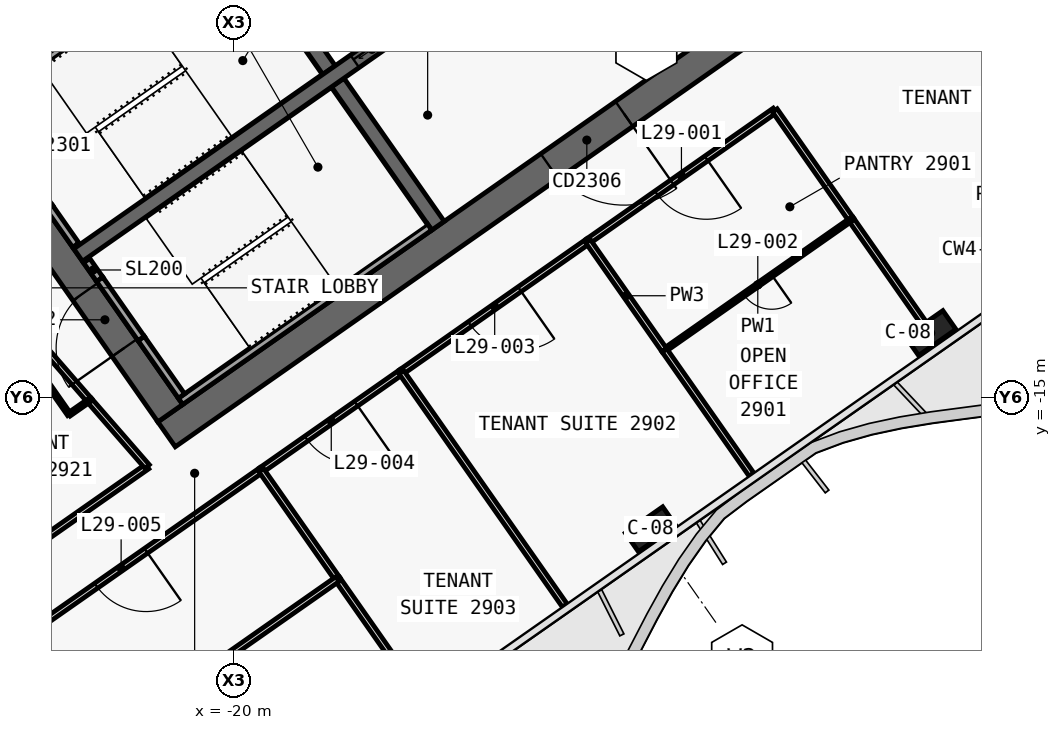
"""IFC4 building model, lengths in metres.
Left out: names, types, materials, properties, quantities, classifications, styles, units other than length and angle.
Written with IfcOpenShell. Run it as: python <this file> out.ifc"""

import sys

from ifc_helpers import new_model, si_unit, direction, frame, frame_2d, origin, origin_2d, place, context, subcontext, project, spatial, polyline, rectangle, outline, extrude, element, fill, save


model = new_model("IFC4")
c1 = context("Model", 3, precision=1e-05, world=origin(), true_north=direction((0.0, 1.0)))
c2 = subcontext(c1, "Body", "Model", "MODEL_VIEW")
j1 = project(units=[si_unit("LENGTHUNIT", "METRE"), si_unit("PLANEANGLEUNIT", "RADIAN")], contexts=[c1])
p1 = place(None, origin())
s1 = spatial("IfcSite", under=j1, at=p1, CompositionType="ELEMENT")
p2 = place(p1, origin())
s2 = spatial("IfcBuilding", under=s1, at=p2, CompositionType="ELEMENT")
p3 = place(p2, frame((0.0, 0.0, 132.0)))
s3 = spatial("IfcBuildingStorey", under=s2, at=p3, CompositionType="ELEMENT", Elevation=132.0)
p4 = place(p3, frame((0.029, 11.984, 0.0), z_axis=(0.0, 0.0, 1.0), x_axis=(-0.819151382952, -0.573577380837, 0.0)))
e1 = element("IfcWall", 1, at=p4, inside=s3, PredefinedType="SHEAR", context=c2, shape_type="SweptSolid", body=[
    extrude(outline(polyline([(33.898, 0.4), (0.56, 0.4), (-0.0, -0.4), (33.898, -0.4), (33.898, 0.4)])), origin(), (0.0, 0.0, 1.0), 3.9),
])
p5 = place(p3, frame((0.029, -0.712, 0.0), z_axis=(0.0, 0.0, 1.0), x_axis=(-0.819151758019, -0.573576845187, 0.0)))
e2 = element("IfcWall", 2, at=p5, inside=s3, PredefinedType="SHEAR", context=c2, shape_type="SweptSolid", body=[
    extrude(outline(polyline([(26.616, 0.4), (0.56, 0.4), (-0.0, -0.4), (26.616, -0.4), (26.616, 0.4)])), origin(), (0.0, 0.0, 1.0), 3.9),
])
p6 = place(p5, frame((2.966, 0.0, 0.0)))
e3 = element("IfcOpeningElement", 3, at=p6, cuts=e2, PredefinedType="OPENING", context=c2, shape_type="SweptSolid", body=[
    extrude(rectangle(XDim=2.4, YDim=2.1, at=frame_2d((1.2, 1.05))), frame((0.0, 0.41, 0.0), z_axis=(0.0, -1.0, 0.0), x_axis=(1.0, 0.0, 0.0)), (0.0, 0.0, 1.0), 0.82),
])
p7 = place(p5, frame((11.916, 0.0, 0.0)))
e4 = element("IfcOpeningElement", 4, at=p7, cuts=e2, PredefinedType="OPENING", context=c2, shape_type="SweptSolid", body=[
    extrude(rectangle(XDim=2.4, YDim=2.1, at=frame_2d((1.2, 1.05))), frame((0.0, 0.41, 0.0), z_axis=(0.0, -1.0, 0.0), x_axis=(1.0, 0.0, 0.0)), (0.0, 0.0, 1.0), 0.82),
])
p8 = place(p3, frame((-21.675, -15.421, 0.0), z_axis=(0.0, 0.0, 1.0), x_axis=(-0.573581815061, 0.819148278049, 0.0)))
e5 = element("IfcWall", 5, at=p8, inside=s3, PredefinedType="SHEAR", context=c2, shape_type="SweptSolid", body=[
    extrude(outline(polyline([(0.0, 0.4), (0.0, -0.4), (9.6, -0.4), (9.6, 0.4), (0.0, 0.4)])), origin(), (0.0, 0.0, 1.0), 3.9),
])
p9 = place(p8, frame((6.3, 0.0, 0.0)))
e6 = element("IfcOpeningElement", 6, at=p9, cuts=e5, PredefinedType="OPENING", context=c2, shape_type="SweptSolid", body=[
    extrude(rectangle(XDim=1.8, YDim=2.1, at=frame_2d((0.9, 1.05))), frame((0.0, 0.41, 0.0), z_axis=(0.0, -1.0, 0.0), x_axis=(1.0, 0.0, 0.0)), (0.0, 0.0, 1.0), 0.82),
])
p10 = place(p8, frame((2.1, 0.0, 0.0)))
e7 = element("IfcOpeningElement", 7, at=p10, cuts=e5, PredefinedType="OPENING", context=c2, shape_type="SweptSolid", body=[
    extrude(rectangle(XDim=1.8, YDim=2.1, at=frame_2d((0.9, 1.05))), frame((0.0, 0.41, 0.0), z_axis=(0.0, -1.0, 0.0), x_axis=(1.0, 0.0, 0.0)), (0.0, 0.0, 1.0), 0.82),
])
p11 = place(p3, frame((-14.63, -10.488, 0.0), z_axis=(0.0, 0.0, 1.0), x_axis=(-0.573611936273, 0.819127185829, 0.0)))
e8 = element("IfcWall", 8, at=p11, inside=s3, PredefinedType="SHEAR", context=c2, shape_type="SweptSolid", body=[
    extrude(outline(polyline([(4.6, 0.2), (0.0, 0.2), (0.0, -0.2), (4.6, -0.2), (4.6, 0.2)])), origin(), (0.0, 0.0, 1.0), 3.9),
])
p12 = place(p3, frame((-17.498, -6.392, 0.0), z_axis=(0.0, 0.0, 1.0), x_axis=(-0.573611936273, 0.819127185829, 0.0)))
e9 = element("IfcWall", 9, at=p12, inside=s3, PredefinedType="SHEAR", context=c2, shape_type="SweptSolid", body=[
    extrude(outline(polyline([(4.6, -0.2), (4.6, 0.2), (0.0, 0.2), (0.0, -0.2), (4.6, -0.2)])), origin(), (0.0, 0.0, 1.0), 3.9),
])
p13 = place(p3, frame((-2.638, 3.768, 0.0), z_axis=(0.0, 0.0, 1.0), x_axis=(-0.81915267502, -0.573575535572, 0.0)))
e10 = element("IfcWall", 10, at=p13, inside=s3, PredefinedType="SHEAR", context=c2, shape_type="SweptSolid", body=[
    extrude(outline(polyline([(26.2, 0.2), (0.0, 0.2), (0.0, -0.2), (26.2, -0.2), (26.2, 0.2)])), origin(), (0.0, 0.0, 1.0), 3.9),
])
p14 = place(p13, frame((1.169, 0.0, 0.0)))
e11 = element("IfcOpeningElement", 11, at=p14, cuts=e10, PredefinedType="OPENING", context=c2, shape_type="SweptSolid", body=[
    extrude(rectangle(XDim=1.1, YDim=2.1, at=frame_2d((0.55, 1.05))), frame((0.0, 0.21, 0.0), z_axis=(0.0, -1.0, 0.0), x_axis=(1.0, 0.0, 0.0)), (0.0, 0.0, 1.0), 0.42),
])
p15 = place(p13, frame((3.206, 0.0, 0.0)))
e12 = element("IfcOpeningElement", 12, at=p15, cuts=e10, PredefinedType="OPENING", context=c2, shape_type="SweptSolid", body=[
    extrude(rectangle(XDim=1.1, YDim=2.1, at=frame_2d((0.55, 1.05))), frame((0.0, 0.21, 0.0), z_axis=(0.0, -1.0, 0.0), x_axis=(1.0, 0.0, 0.0)), (0.0, 0.0, 1.0), 0.42),
])
p16 = place(p13, frame((5.244, 0.0, 0.0)))
e13 = element("IfcOpeningElement", 13, at=p16, cuts=e10, PredefinedType="OPENING", context=c2, shape_type="SweptSolid", body=[
    extrude(rectangle(XDim=1.1, YDim=2.1, at=frame_2d((0.55, 1.05))), frame((0.0, 0.21, 0.0), z_axis=(0.0, -1.0, 0.0), x_axis=(1.0, 0.0, 0.0)), (0.0, 0.0, 1.0), 0.42),
])
p17 = place(p13, frame((7.281, 0.0, 0.0)))
e14 = element("IfcOpeningElement", 14, at=p17, cuts=e10, PredefinedType="OPENING", context=c2, shape_type="SweptSolid", body=[
    extrude(rectangle(XDim=1.1, YDim=2.1, at=frame_2d((0.55, 1.05))), frame((0.0, 0.21, 0.0), z_axis=(0.0, -1.0, 0.0), x_axis=(1.0, 0.0, 0.0)), (0.0, 0.0, 1.0), 0.42),
])
p18 = place(p13, frame((9.688, 0.0, 0.0)))
e15 = element("IfcOpeningElement", 15, at=p18, cuts=e10, PredefinedType="OPENING", context=c2, shape_type="SweptSolid", body=[
    extrude(rectangle(XDim=1.1, YDim=2.1, at=frame_2d((0.55, 1.05))), frame((0.0, 0.21, 0.0), z_axis=(0.0, -1.0, 0.0), x_axis=(1.0, 0.0, 0.0)), (0.0, 0.0, 1.0), 0.42),
])
p19 = place(p13, frame((11.863, 0.0, 0.0)))
e16 = element("IfcOpeningElement", 16, at=p19, cuts=e10, PredefinedType="OPENING", context=c2, shape_type="SweptSolid", body=[
    extrude(rectangle(XDim=1.1, YDim=2.1, at=frame_2d((0.55, 1.05))), frame((0.0, 0.21, 0.0), z_axis=(0.0, -1.0, 0.0), x_axis=(1.0, 0.0, 0.0)), (0.0, 0.0, 1.0), 0.42),
])
p20 = place(p13, frame((14.038, 0.0, 0.0)))
e17 = element("IfcOpeningElement", 17, at=p20, cuts=e10, PredefinedType="OPENING", context=c2, shape_type="SweptSolid", body=[
    extrude(rectangle(XDim=1.1, YDim=2.1, at=frame_2d((0.55, 1.05))), frame((0.0, 0.21, 0.0), z_axis=(0.0, -1.0, 0.0), x_axis=(1.0, 0.0, 0.0)), (0.0, 0.0, 1.0), 0.42),
])
p21 = place(p13, frame((16.212, 0.0, 0.0)))
e18 = element("IfcOpeningElement", 18, at=p21, cuts=e10, PredefinedType="OPENING", context=c2, shape_type="SweptSolid", body=[
    extrude(rectangle(XDim=1.1, YDim=2.1, at=frame_2d((0.55, 1.05))), frame((0.0, 0.21, 0.0), z_axis=(0.0, -1.0, 0.0), x_axis=(1.0, 0.0, 0.0)), (0.0, 0.0, 1.0), 0.42),
])
for number, where, z_axis, x_axis in (
    (19, (-1.665, -13.313, 0.0), (0.0, 0.0, 1.0), (-0.819, -0.574, 0.0)),
    (20, (-9.038, -18.475, 0.0), (0.0, 0.0, 1.0), (-0.819, -0.574, 0.0)),
):
    element("IfcColumn", number, at=place(p3, frame(where, z_axis=z_axis, x_axis=x_axis)), inside=s3, PredefinedType="COLUMN", context=c2, shape_type="SweptSolid", body=[
        extrude(rectangle(XDim=1.2, YDim=0.6, at=origin_2d()), origin(), (0.0, 0.0, 1.0), 3.9),
    ])
p22 = place(p3, frame((-20.243, -2.821, 0.0), z_axis=(0.0, 0.0, 1.0), x_axis=(-0.819141584393, -0.57359137434, 0.0)))
e21 = element("IfcWall", 21, at=p22, inside=s3, PredefinedType="SOLIDWALL", context=c2, shape_type="SweptSolid", body=[
    extrude(rectangle(XDim=8.0, YDim=0.2, at=frame_2d((4.0, 0.0))), origin(), (0.0, 0.0, 1.0), 3.62),
])
p23 = place(p3, frame((-24.162, -10.998, 0.0), z_axis=(0.0, 0.0, 1.0), x_axis=(-0.573612502218, 0.819126789514, 0.0)))
e22 = element("IfcWall", 22, at=p23, inside=s3, PredefinedType="SOLIDWALL", context=c2, shape_type="SweptSolid", body=[
    extrude(rectangle(XDim=1.2, YDim=0.2, at=frame_2d((0.6, 0.0))), origin(), (0.0, 0.0, 1.0), 3.62),
])
p24 = place(p3, frame((-24.85, -10.014, 2.15), z_axis=(0.0, 0.0, 1.0), x_axis=(-0.573505465124, 0.819201734296, 0.0)))
e23 = element("IfcWall", 23, at=p24, inside=s3, PredefinedType="SOLIDWALL", context=c2, shape_type="SweptSolid", body=[
    extrude(rectangle(XDim=1.9, YDim=0.2, at=frame_2d((0.95, 0.0))), origin(), (0.0, 0.0, 1.0), 1.47),
])
p25 = place(p3, frame((-14.851, -10.521, 0.0), z_axis=(0.0, 0.0, 1.0), x_axis=(-0.819141584393, -0.57359137434, 0.0)))
e24 = element("IfcWall", 24, at=p25, inside=s3, PredefinedType="SOLIDWALL", context=c2, shape_type="SweptSolid", body=[
    extrude(rectangle(XDim=8.0, YDim=0.2, at=frame_2d((4.0, 0.0))), origin(), (0.0, 0.0, 1.0), 3.62),
])
p26 = place(p3, frame((-21.38, -14.97, 0.0), z_axis=(0.0, 0.0, 1.0), x_axis=(-0.573559770908, 0.819163713305, 0.0)))
e25 = element("IfcWall", 25, at=p26, inside=s3, PredefinedType="SOLIDWALL", context=c2, shape_type="SweptSolid", body=[
    extrude(rectangle(XDim=1.85, YDim=0.2, at=frame_2d((0.925, 0.0))), origin(), (0.0, 0.0, 1.0), 3.62),
])
p27 = place(p3, frame((-23.531, -11.898, 0.0), z_axis=(0.0, 0.0, 1.0), x_axis=(-0.573708088123, 0.819059844958, 0.0)))
e26 = element("IfcWall", 26, at=p27, inside=s3, PredefinedType="SOLIDWALL", context=c2, shape_type="SweptSolid", body=[
    extrude(rectangle(XDim=0.6, YDim=0.2, at=frame_2d((0.3, 0.0))), origin(), (0.0, 0.0, 1.0), 3.62),
])
p28 = place(p3, frame((-22.441, -13.455, 2.15), z_axis=(0.0, 0.0, 1.0), x_axis=(-0.573591692345, 0.819141361715, 0.0)))
e27 = element("IfcWall", 27, at=p28, inside=s3, PredefinedType="SOLIDWALL", context=c2, shape_type="SweptSolid", body=[
    extrude(rectangle(XDim=1.9, YDim=0.2, at=frame_2d((0.95, 0.0))), origin(), (0.0, 0.0, 1.0), 1.47),
])
p29 = place(p3, frame((-30.146, -22.33, 0.0), z_axis=(0.0, 0.0, 1.0), x_axis=(0.819150657747, 0.573578416533, 0.0)))
e28 = element("IfcWall", 28, at=p29, inside=s3, PredefinedType="PARTITIONING", context=c2, shape_type="SweptSolid", body=[
    extrude(rectangle(XDim=9.599, YDim=0.15, at=frame_2d((4.799, 0.0))), origin(), (0.0, 0.0, 1.0), 3.0),
])
p30 = place(p29, frame((4.0, 0.0, 0.0)))
e29 = element("IfcOpeningElement", 29, at=p30, cuts=e28, PredefinedType="OPENING", context=c2, shape_type="SweptSolid", body=[
    extrude(rectangle(XDim=1.6, YDim=2.1, at=frame_2d((0.8, 1.05))), frame((0.0, 0.085, 0.0), z_axis=(0.0, -1.0, 0.0), x_axis=(1.0, 0.0, 0.0)), (0.0, 0.0, 1.0), 0.17),
])
p31 = place(p3, frame((-5.766, -7.456, 0.0), z_axis=(0.0, 0.0, 1.0), x_axis=(-0.819147828287, -0.573582457378, 0.0)))
e30 = element("IfcWall", 30, at=p31, inside=s3, PredefinedType="PARTITIONING", context=c2, shape_type="SweptSolid", body=[
    extrude(rectangle(XDim=6.002, YDim=0.15, at=frame_2d((3.001, 0.0))), origin(), (0.0, 0.0, 1.0), 3.0),
])
p32 = place(p31, frame((2.201, 0.0, 0.0)))
e31 = element("IfcOpeningElement", 31, at=p32, cuts=e30, PredefinedType="OPENING", context=c2, shape_type="SweptSolid", body=[
    extrude(rectangle(XDim=1.6, YDim=2.1, at=frame_2d((0.8, 1.05))), frame((0.0, 0.085, 0.0), z_axis=(0.0, -1.0, 0.0), x_axis=(1.0, 0.0, 0.0)), (0.0, 0.0, 1.0), 0.17),
])
p33 = place(p3, frame((-10.68, -10.896, 0.0), z_axis=(0.0, 0.0, 1.0), x_axis=(-0.819145946981, -0.573585144111, 0.0)))
e32 = element("IfcWall", 32, at=p33, inside=s3, PredefinedType="PARTITIONING", context=c2, shape_type="SweptSolid", body=[
    extrude(rectangle(XDim=6.004, YDim=0.15, at=frame_2d((3.002, 0.0))), origin(), (0.0, 0.0, 1.0), 3.0),
])
p34 = place(p33, frame((2.202, 0.0, 0.0)))
e33 = element("IfcOpeningElement", 33, at=p34, cuts=e32, PredefinedType="OPENING", context=c2, shape_type="SweptSolid", body=[
    extrude(rectangle(XDim=1.6, YDim=2.1, at=frame_2d((0.8, 1.05))), frame((0.0, 0.085, 0.0), z_axis=(0.0, -1.0, 0.0), x_axis=(1.0, 0.0, 0.0)), (0.0, 0.0, 1.0), 0.17),
])
p35 = place(p3, frame((-15.594, -14.338, 0.0), z_axis=(0.0, 0.0, 1.0), x_axis=(-0.819165703328, -0.573556928727, 0.0)))
e34 = element("IfcWall", 34, at=p35, inside=s3, PredefinedType="PARTITIONING", context=c2, shape_type="SweptSolid", body=[
    extrude(rectangle(XDim=4.504, YDim=0.15, at=frame_2d((2.252, 0.0))), origin(), (0.0, 0.0, 1.0), 3.62),
])
p36 = place(p35, frame((1.452, 0.0, 0.0)))
e35 = element("IfcOpeningElement", 35, at=p36, cuts=e34, PredefinedType="OPENING", context=c2, shape_type="SweptSolid", body=[
    extrude(rectangle(XDim=1.6, YDim=2.1, at=frame_2d((0.8, 1.05))), frame((0.0, 0.085, 0.0), z_axis=(0.0, -1.0, 0.0), x_axis=(1.0, 0.0, 0.0)), (0.0, 0.0, 1.0), 0.17),
])
p37 = place(p3, frame((-19.281, -16.919, 0.0), z_axis=(0.0, 0.0, 1.0), x_axis=(-0.819151661297, -0.57357698332, 0.0)))
e36 = element("IfcWall", 36, at=p37, inside=s3, PredefinedType="PARTITIONING", context=c2, shape_type="SweptSolid", body=[
    extrude(rectangle(XDim=9.004, YDim=0.15, at=frame_2d((4.502, 0.0))), origin(), (0.0, 0.0, 1.0), 3.0),
])
p38 = place(p37, frame((3.702, 0.0, 0.0)))
e37 = element("IfcOpeningElement", 37, at=p38, cuts=e36, PredefinedType="OPENING", context=c2, shape_type="SweptSolid", body=[
    extrude(rectangle(XDim=1.6, YDim=2.1, at=frame_2d((0.8, 1.05))), frame((0.0, 0.085, 0.0), z_axis=(0.0, -1.0, 0.0), x_axis=(1.0, 0.0, 0.0)), (0.0, 0.0, 1.0), 0.17),
])
p39 = place(p3, frame((-1.849, -13.051, 0.0), z_axis=(0.0, 0.0, 1.0), x_axis=(-0.573600070244, 0.819135495151, 0.0)))
e38 = element("IfcWall", 38, at=p39, inside=s3, PredefinedType="PARTITIONING", context=c2, shape_type="SweptSolid", body=[
    extrude(rectangle(XDim=3.331, YDim=0.15, at=frame_2d((1.666, 0.0))), origin(), (0.0, 0.0, 1.0), 3.0),
])
p40 = place(p3, frame((-3.758, -10.324, 0.0), z_axis=(0.0, 0.0, 1.0), x_axis=(-0.573560539213, 0.819163175355, 0.0)))
e39 = element("IfcWall", 39, at=p40, inside=s3, PredefinedType="PARTITIONING", context=c2, shape_type="SweptSolid", body=[
    extrude(rectangle(XDim=3.504, YDim=0.15, at=frame_2d((1.752, 0.0))), origin(), (0.0, 0.0, 1.0), 3.0),
])
p41 = place(p3, frame((-23.802, -15.082, 0.0), z_axis=(0.0, 0.0, 1.0), x_axis=(-0.656784983898, 0.754077903751, 0.0)))
e40 = element("IfcWall", 40, at=p41, inside=s3, PredefinedType="PARTITIONING", context=c2, shape_type="SweptSolid", body=[
    extrude(rectangle(XDim=4.226, YDim=0.15, at=frame_2d((2.113, 0.0))), origin(), (0.0, 0.0, 1.0), 3.62),
])
p42 = place(p3, frame((-22.284, -16.826, 0.0), z_axis=(0.0, 0.0, 1.0), x_axis=(-0.656749820099, 0.754108529192, 0.0)))
e41 = element("IfcWall", 41, at=p42, inside=s3, PredefinedType="PARTITIONING", context=c2, shape_type="SweptSolid", body=[
    extrude(rectangle(XDim=2.317, YDim=0.15, at=frame_2d((1.159, 0.0))), origin(), (0.0, 0.0, 1.0), 3.0),
])
p43 = place(p3, frame((-24.337, -15.454, 0.0), z_axis=(0.0, 0.0, 1.0), x_axis=(0.819196675611, 0.573512690938, 0.0)))
e42 = element("IfcWall", 42, at=p43, inside=s3, PredefinedType="PARTITIONING", context=c2, shape_type="SweptSolid", body=[
    extrude(rectangle(XDim=0.651, YDim=0.1, at=frame_2d((0.325, 0.0))), origin(), (0.0, 0.0, 1.0), 3.62),
])
p44 = place(p3, frame((-25.026, -14.47, 0.0), z_axis=(0.0, 0.0, 1.0), x_axis=(0.57359875229, -0.819136418047, 0.0)))
e43 = element("IfcWall", 43, at=p44, inside=s3, PredefinedType="PARTITIONING", context=c2, shape_type="SweptSolid", body=[
    extrude(rectangle(XDim=1.201, YDim=0.1, at=frame_2d((0.601, 0.0))), origin(), (0.0, 0.0, 1.0), 3.62),
])
p45 = place(p3, frame((-3.758, -10.324, 0.0), z_axis=(0.0, 0.0, 1.0), x_axis=(-0.819149710902, -0.573579768758, 0.0)))
e44 = element("IfcWall", 44, at=p45, inside=s3, PredefinedType="PARTITIONING", context=c2, shape_type="SweptSolid", body=[
    extrude(rectangle(XDim=6.0, YDim=0.1, at=frame_2d((3.0, 0.0))), origin(), (0.0, 0.0, 1.0), 3.0),
])
p46 = place(p45, frame((2.55, 0.0, 0.0)))
e45 = element("IfcOpeningElement", 45, at=p46, cuts=e44, PredefinedType="OPENING", context=c2, shape_type="SweptSolid", body=[
    extrude(rectangle(XDim=0.9, YDim=2.1, at=frame_2d((0.45, 1.05))), frame((0.0, 0.06, 0.0), z_axis=(0.0, -1.0, 0.0), x_axis=(1.0, 0.0, 0.0)), (0.0, 0.0, 1.0), 0.12),
])
p47 = place(p3, frame((-6.379, -17.041, 0.0), z_axis=(0.0, 0.0, 1.0), x_axis=(-0.573560675104, 0.819163080207, 0.0)))
e46 = element("IfcWall", 46, at=p47, inside=s3, PredefinedType="PARTITIONING", context=c2, shape_type="SweptSolid", body=[
    extrude(rectangle(XDim=3.999, YDim=0.15, at=frame_2d((2.0, 0.0))), origin(), (0.0, 0.0, 1.0), 2.9),
])
p48 = place(p3, frame((-8.674, -13.764, 0.0), z_axis=(0.0, 0.0, 1.0), x_axis=(-0.573612130335, 0.819127049933, 0.0)))
e47 = element("IfcWall", 47, at=p48, inside=s3, PredefinedType="PARTITIONING", context=c2, shape_type="SweptSolid", body=[
    extrude(rectangle(XDim=3.5, YDim=0.15, at=frame_2d((1.75, 0.0))), origin(), (0.0, 0.0, 1.0), 3.62),
])
p49 = place(p3, frame((-11.294, -20.482, 0.0), z_axis=(0.0, 0.0, 1.0), x_axis=(-0.573560650686, 0.819163097304, 0.0)))
e48 = element("IfcWall", 48, at=p49, inside=s3, PredefinedType="PARTITIONING", context=c2, shape_type="SweptSolid", body=[
    extrude(rectangle(XDim=7.5, YDim=0.15, at=frame_2d((3.75, 0.0))), origin(), (0.0, 0.0, 1.0), 2.9),
])
p50 = place(p3, frame((-17.274, -19.789, 0.0), z_axis=(0.0, 0.0, 1.0), x_axis=(-0.573602698703, 0.819133654565, 0.0)))
e49 = element("IfcWall", 49, at=p50, inside=s3, PredefinedType="PARTITIONING", context=c2, shape_type="SweptSolid", body=[
    extrude(rectangle(XDim=3.502, YDim=0.15, at=frame_2d((1.751, 0.0))), origin(), (0.0, 0.0, 1.0), 3.62),
])
p51 = place(p3, frame((-14.98, -23.063, 0.0), z_axis=(0.0, 0.0, 1.0), x_axis=(-0.57356471828, 0.819160249246, 0.0)))
e50 = element("IfcWall", 50, at=p51, inside=s3, PredefinedType="PARTITIONING", context=c2, shape_type="SweptSolid", body=[
    extrude(rectangle(XDim=4.001, YDim=0.15, at=frame_2d((2.0, 0.0))), origin(), (0.0, 0.0, 1.0), 2.9),
])
p52 = place(p3, frame((-17.275, -19.787, 0.0), z_axis=(0.0, 0.0, 1.0), x_axis=(-0.819154173185, -0.573573395961, 0.0)))
e51 = element("IfcWall", 51, at=p52, inside=s3, PredefinedType="PARTITIONING", context=c2, shape_type="SweptSolid", body=[
    extrude(rectangle(XDim=9.0, YDim=0.15, at=frame_2d((4.5, 0.0))), origin(), (0.0, 0.0, 1.0), 3.0),
])
p53 = place(p21, origin())
e52 = element("IfcDoor", 52, at=p53, inside=s3, OperationType="SLIDING_TO_RIGHT", PredefinedType="DOOR", context=c2, shape_type="SweptSolid", body=[
    extrude(rectangle(XDim=1.1, YDim=2.1, at=frame_2d((0.55, 1.05))), frame((0.0, 0.025, 0.0), z_axis=(0.0, -1.0, 0.0), x_axis=(1.0, 0.0, 0.0)), (0.0, 0.0, 1.0), 0.05),
])
fill(e18, e52)
p54 = place(p7, origin())
e53 = element("IfcDoor", 53, at=p54, inside=s3, OperationType="DOUBLE_DOOR_SINGLE_SWING", PredefinedType="DOOR", context=c2, shape_type="SweptSolid", body=[
    extrude(rectangle(XDim=2.4, YDim=2.1, at=frame_2d((1.2, 1.05))), frame((0.0, 0.025, 0.0), z_axis=(0.0, -1.0, 0.0), x_axis=(1.0, 0.0, 0.0)), (0.0, 0.0, 1.0), 0.05),
])
fill(e4, e53)
p55 = place(p10, origin())
e54 = element("IfcDoor", 54, at=p55, inside=s3, OperationType="DOUBLE_DOOR_SINGLE_SWING", PredefinedType="DOOR", context=c2, shape_type="SweptSolid", body=[
    extrude(rectangle(XDim=1.8, YDim=2.1, at=frame_2d((0.9, 1.05))), frame((0.0, 0.025, 0.0), z_axis=(0.0, -1.0, 0.0), x_axis=(1.0, 0.0, 0.0)), (0.0, 0.0, 1.0), 0.05),
])
fill(e7, e54)
p56 = place(p32, origin())
e55 = element("IfcDoor", 55, at=p56, inside=s3, OperationType="DOUBLE_DOOR_SINGLE_SWING", PredefinedType="DOOR", context=c2, shape_type="SweptSolid", body=[
    extrude(rectangle(XDim=1.6, YDim=2.1, at=frame_2d((0.8, 1.05))), frame((0.0, 0.025, 0.0), z_axis=(0.0, -1.0, 0.0), x_axis=(1.0, 0.0, 0.0)), (0.0, 0.0, 1.0), 0.05),
])
fill(e31, e55)
p57 = place(p46, origin())
e56 = element("IfcDoor", 56, at=p57, inside=s3, OperationType="SINGLE_SWING_RIGHT", PredefinedType="DOOR", context=c2, shape_type="SweptSolid", body=[
    extrude(rectangle(XDim=0.9, YDim=2.1, at=frame_2d((0.45, 1.05))), frame((0.0, 0.025, 0.0), z_axis=(0.0, -1.0, 0.0), x_axis=(1.0, 0.0, 0.0)), (0.0, 0.0, 1.0), 0.05),
])
fill(e45, e56)
p58 = place(p34, origin())
e57 = element("IfcDoor", 57, at=p58, inside=s3, OperationType="DOUBLE_DOOR_SINGLE_SWING", PredefinedType="DOOR", context=c2, shape_type="SweptSolid", body=[
    extrude(rectangle(XDim=1.6, YDim=2.1, at=frame_2d((0.8, 1.05))), frame((0.0, 0.025, 0.0), z_axis=(0.0, -1.0, 0.0), x_axis=(1.0, 0.0, 0.0)), (0.0, 0.0, 1.0), 0.05),
])
fill(e33, e57)
p59 = place(p36, origin())
e58 = element("IfcDoor", 58, at=p59, inside=s3, OperationType="DOUBLE_DOOR_SINGLE_SWING", PredefinedType="DOOR", context=c2, shape_type="SweptSolid", body=[
    extrude(rectangle(XDim=1.6, YDim=2.1, at=frame_2d((0.8, 1.05))), frame((0.0, 0.025, 0.0), z_axis=(0.0, -1.0, 0.0), x_axis=(1.0, 0.0, 0.0)), (0.0, 0.0, 1.0), 0.05),
])
fill(e35, e58)
p60 = place(p38, origin())
e59 = element("IfcDoor", 59, at=p60, inside=s3, OperationType="DOUBLE_DOOR_SINGLE_SWING", PredefinedType="DOOR", context=c2, shape_type="SweptSolid", body=[
    extrude(rectangle(XDim=1.6, YDim=2.1, at=frame_2d((0.8, 1.05))), frame((0.0, 0.025, 0.0), z_axis=(0.0, -1.0, 0.0), x_axis=(1.0, 0.0, 0.0)), (0.0, 0.0, 1.0), 0.05),
])
fill(e37, e59)
save(model, sys.argv[1])
